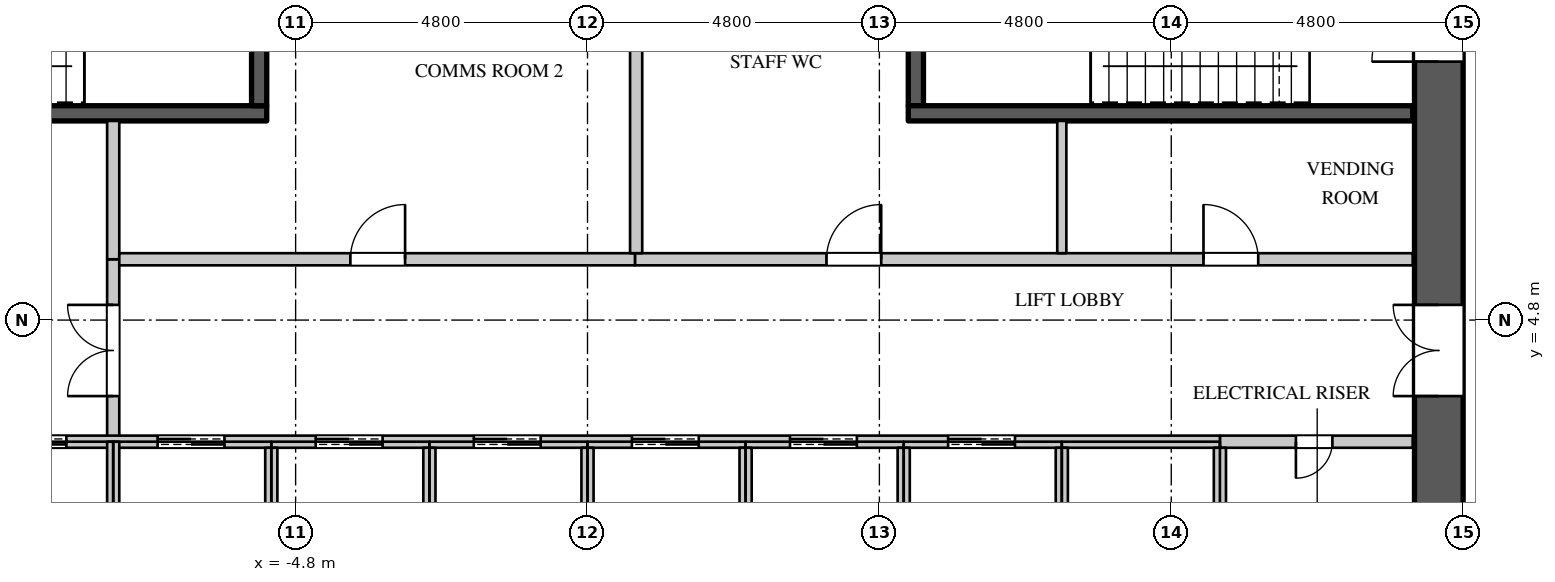
"""IFC4 building model, lengths in metres.
Left out: names, types, materials, properties, quantities, classifications, styles, units other than length and angle.
Written with IfcOpenShell. Run it as: python <this file> out.ifc"""

import sys

from ifc_helpers import new_model, si_unit, direction, frame, frame_2d, origin, place, context, subcontext, project, spatial, rectangle, extrude, element, fill, save


model = new_model("IFC4")
c1 = context("Model", 3, precision=1e-05, world=origin(), true_north=direction((0.0, 1.0)))
c2 = subcontext(c1, "Body", "Model", "MODEL_VIEW")
j1 = project(units=[si_unit("LENGTHUNIT", "METRE"), si_unit("PLANEANGLEUNIT", "RADIAN")], contexts=[c1])
p1 = place(None, origin())
s1 = spatial("IfcSite", under=j1, at=p1, CompositionType="ELEMENT")
p2 = place(p1, origin())
s2 = spatial("IfcBuilding", under=s1, at=p2, CompositionType="ELEMENT")
p3 = place(p2, frame((0.0, 0.0, 148.5)))
s3 = spatial("IfcBuildingStorey", under=s2, at=p3, CompositionType="ELEMENT", Elevation=148.5)
p4 = place(p3, frame((14.0, -11.2, 0.0), z_axis=(0.0, 0.0, 1.0), x_axis=(0.0, 1.0, 0.0)))
e1 = element("IfcWall", 1, at=p4, inside=s3, PredefinedType="SHEAR", context=c2, shape_type="SweptSolid", body=[
    extrude(rectangle(XDim=22.4, YDim=0.8, at=frame_2d((11.2, 0.0))), origin(), (0.0, 0.0, 1.0), 4.2),
])
p5 = place(p4, frame((20.25, 0.0, 0.0)))
e2 = element("IfcOpeningElement", 2, at=p5, cuts=e1, PredefinedType="OPENING", context=c2, shape_type="SweptSolid", body=[
    extrude(rectangle(XDim=1.1, YDim=2.2, at=frame_2d((0.55, 1.1))), frame((0.0, 0.41, 0.0), z_axis=(0.0, -1.0, 0.0), x_axis=(1.0, 0.0, 0.0)), (0.0, 0.0, 1.0), 0.82),
])
p6 = place(p4, frame((1.05, 0.0, 0.0)))
e3 = element("IfcOpeningElement", 3, at=p6, cuts=e1, PredefinedType="OPENING", context=c2, shape_type="SweptSolid", body=[
    extrude(rectangle(XDim=1.1, YDim=2.2, at=frame_2d((0.55, 1.1))), frame((0.0, 0.41, 0.0), z_axis=(0.0, -1.0, 0.0), x_axis=(1.0, 0.0, 0.0)), (0.0, 0.0, 1.0), 0.82),
])
p7 = place(p4, frame((14.75, 0.0, 0.0)))
e4 = element("IfcOpeningElement", 4, at=p7, cuts=e1, PredefinedType="OPENING", context=c2, shape_type="SweptSolid", body=[
    extrude(rectangle(XDim=1.5, YDim=2.4, at=frame_2d((0.75, 1.2))), frame((0.0, 0.41, 0.0), z_axis=(0.0, -1.0, 0.0), x_axis=(1.0, 0.0, 0.0)), (0.0, 0.0, 1.0), 0.82),
])
p8 = place(p4, frame((6.15, 0.0, 0.0)))
e5 = element("IfcOpeningElement", 5, at=p8, cuts=e1, PredefinedType="OPENING", context=c2, shape_type="SweptSolid", body=[
    extrude(rectangle(XDim=1.5, YDim=2.4, at=frame_2d((0.75, 1.2))), frame((0.0, 0.41, 0.0), z_axis=(0.0, -1.0, 0.0), x_axis=(1.0, 0.0, 0.0)), (0.0, 0.0, 1.0), 0.82),
])
p9 = place(p3, frame((-7.8, 2.8, 0.0), z_axis=(0.0, 0.0, 1.0), x_axis=(0.0, 1.0, 0.0)))
e6 = element("IfcWall", 6, at=p9, inside=s3, PredefinedType="PARTITIONING", context=c2, shape_type="SweptSolid", body=[
    extrude(rectangle(XDim=3.0, YDim=0.2, at=frame_2d((1.5, 0.0))), origin(), (0.0, 0.0, 1.0), 3.798),
])
p10 = place(p9, frame((0.75, 0.0, 0.0)))
e7 = element("IfcOpeningElement", 7, at=p10, cuts=e6, PredefinedType="OPENING", context=c2, shape_type="SweptSolid", body=[
    extrude(rectangle(XDim=1.5, YDim=2.4, at=frame_2d((0.75, 1.2))), frame((0.0, 0.11, 0.0), z_axis=(0.0, -1.0, 0.0), x_axis=(1.0, 0.0, 0.0)), (0.0, 0.0, 1.0), 0.22),
])
p11 = place(p3, frame((0.78, 5.8, 0.0), z_axis=(0.0, 0.0, 1.0), x_axis=(1.0, 0.0, 0.0)))
e8 = element("IfcWall", 8, at=p11, inside=s3, PredefinedType="PARTITIONING", context=c2, shape_type="SweptSolid", body=[
    extrude(rectangle(XDim=12.79, YDim=0.2, at=frame_2d((6.395, 0.0))), origin(), (0.0, 0.0, 1.0), 3.798),
])
p12 = place(p11, frame((3.15, 0.0, 0.0)))
e9 = element("IfcOpeningElement", 9, at=p12, cuts=e8, PredefinedType="OPENING", context=c2, shape_type="SweptSolid", body=[
    extrude(rectangle(XDim=0.9, YDim=2.2, at=frame_2d((0.45, 1.1))), frame((0.0, 0.11, 0.0), z_axis=(0.0, -1.0, 0.0), x_axis=(1.0, 0.0, 0.0)), (0.0, 0.0, 1.0), 0.22),
])
p13 = place(p11, frame((9.35, 0.0, 0.0)))
e10 = element("IfcOpeningElement", 10, at=p13, cuts=e8, PredefinedType="OPENING", context=c2, shape_type="SweptSolid", body=[
    extrude(rectangle(XDim=0.9, YDim=2.2, at=frame_2d((0.45, 1.1))), frame((0.0, 0.11, 0.0), z_axis=(0.0, -1.0, 0.0), x_axis=(1.0, 0.0, 0.0)), (0.0, 0.0, 1.0), 0.22),
])
p14 = place(p3, frame((7.8, 5.9, 0.0), z_axis=(0.0, 0.0, 1.0), x_axis=(0.0, 1.0, 0.0)))
e11 = element("IfcWall", 11, at=p14, inside=s3, PredefinedType="PARTITIONING", context=c2, shape_type="SweptSolid", body=[
    extrude(rectangle(XDim=2.175, YDim=0.15, at=frame_2d((1.087, 0.0))), origin(), (0.0, 0.0, 1.0), 3.798),
])
p15 = place(p3, frame((-7.8, 5.8, 0.0), z_axis=(0.0, 0.0, 1.0), x_axis=(0.0, 1.0, 0.0)))
e12 = element("IfcWall", 12, at=p15, inside=s3, PredefinedType="PARTITIONING", context=c2, shape_type="SweptSolid", body=[
    extrude(rectangle(XDim=2.275, YDim=0.2, at=frame_2d((1.137, 0.0))), origin(), (0.0, 0.0, 1.0), 3.798),
])
p16 = place(p3, frame((-7.7, 5.8, 0.0), z_axis=(0.0, 0.0, 1.0), x_axis=(1.0, 0.0, 0.0)))
e13 = element("IfcWall", 13, at=p16, inside=s3, PredefinedType="PARTITIONING", context=c2, shape_type="SweptSolid", body=[
    extrude(rectangle(XDim=8.48, YDim=0.2, at=frame_2d((4.24, 0.0))), origin(), (0.0, 0.0, 1.0), 3.798),
])
p17 = place(p16, frame((3.8, 0.0, 0.0)))
e14 = element("IfcOpeningElement", 14, at=p17, cuts=e13, PredefinedType="OPENING", context=c2, shape_type="SweptSolid", body=[
    extrude(rectangle(XDim=0.9, YDim=2.2, at=frame_2d((0.45, 1.1))), frame((0.0, 0.11, 0.0), z_axis=(0.0, -1.0, 0.0), x_axis=(1.0, 0.0, 0.0)), (0.0, 0.0, 1.0), 0.22),
])
p18 = place(p3, frame((0.8, 5.9, 0.0), z_axis=(0.0, 0.0, 1.0), x_axis=(0.0, 1.0, 0.0)))
e15 = element("IfcWall", 15, at=p18, inside=s3, PredefinedType="PARTITIONING", context=c2, shape_type="SweptSolid", body=[
    extrude(rectangle(XDim=5.27, YDim=0.2, at=frame_2d((2.635, 0.0))), origin(), (0.0, 0.0, 1.0), 3.798),
])
p19 = place(p3, frame((10.4, 2.8, 0.0), z_axis=(0.0, 0.0, 1.0), x_axis=(1.0, 0.0, 0.0)))
e16 = element("IfcWall", 16, at=p19, inside=s3, PredefinedType="PARTITIONING", context=c2, shape_type="SweptSolid", body=[
    extrude(rectangle(XDim=3.17, YDim=0.2, at=frame_2d((1.585, 0.0))), origin(), (0.0, 0.0, 1.0), 3.798),
])
p20 = place(p19, frame((1.25, 0.0, 0.0)))
e17 = element("IfcOpeningElement", 17, at=p20, cuts=e16, PredefinedType="OPENING", context=c2, shape_type="SweptSolid", body=[
    extrude(rectangle(XDim=0.6, YDim=2.0, at=frame_2d((0.3, 1.0))), frame((0.0, 0.11, 0.0), z_axis=(0.0, -1.0, 0.0), x_axis=(1.0, 0.0, 0.0)), (0.0, 0.0, 1.0), 0.22),
])
p21 = place(p3, frame((-13.57, 2.8, 0.0), z_axis=(0.0, 0.0, 1.0), x_axis=(1.0, 0.0, 0.0)))
e18 = element("IfcWall", 18, at=p21, inside=s3, PredefinedType="PARTITIONING", context=c2, shape_type="SweptSolid", body=[
    extrude(rectangle(XDim=23.97, YDim=0.2, at=frame_2d((11.985, 0.0))), origin(), (0.0, 0.0, 1.0), 3.798),
])
p22 = place(p21, frame((1.0, 0.0, 0.0)))
e19 = element("IfcOpeningElement", 19, at=p22, cuts=e18, PredefinedType="OPENING", context=c2, shape_type="SweptSolid", body=[
    extrude(rectangle(XDim=1.1, YDim=2.2, at=frame_2d((0.55, 1.1))), frame((0.0, 0.11, 0.0), z_axis=(0.0, -1.0, 0.0), x_axis=(1.0, 0.0, 0.0)), (0.0, 0.0, 1.0), 0.22),
])
p23 = place(p21, frame((3.9, 0.0, 0.0)))
e20 = element("IfcOpeningElement", 20, at=p23, cuts=e18, PredefinedType="OPENING", context=c2, shape_type="SweptSolid", body=[
    extrude(rectangle(XDim=1.1, YDim=2.2, at=frame_2d((0.55, 1.1))), frame((0.0, 0.11, 0.0), z_axis=(0.0, -1.0, 0.0), x_axis=(1.0, 0.0, 0.0)), (0.0, 0.0, 1.0), 0.22),
])
p24 = place(p21, frame((6.5, 0.0, 0.0)))
e21 = element("IfcOpeningElement", 21, at=p24, cuts=e18, PredefinedType="OPENING", context=c2, shape_type="SweptSolid", body=[
    extrude(rectangle(XDim=1.1, YDim=2.2, at=frame_2d((0.55, 1.1))), frame((0.0, 0.11, 0.0), z_axis=(0.0, -1.0, 0.0), x_axis=(1.0, 0.0, 0.0)), (0.0, 0.0, 1.0), 0.22),
])
p25 = place(p21, frame((9.1, 0.0, 0.0)))
e22 = element("IfcOpeningElement", 22, at=p25, cuts=e18, PredefinedType="OPENING", context=c2, shape_type="SweptSolid", body=[
    extrude(rectangle(XDim=1.1, YDim=2.2, at=frame_2d((0.55, 1.1))), frame((0.0, 0.11, 0.0), z_axis=(0.0, -1.0, 0.0), x_axis=(1.0, 0.0, 0.0)), (0.0, 0.0, 1.0), 0.22),
])
p26 = place(p21, frame((11.7, 0.0, 0.0)))
e23 = element("IfcOpeningElement", 23, at=p26, cuts=e18, PredefinedType="OPENING", context=c2, shape_type="SweptSolid", body=[
    extrude(rectangle(XDim=1.1, YDim=2.2, at=frame_2d((0.55, 1.1))), frame((0.0, 0.11, 0.0), z_axis=(0.0, -1.0, 0.0), x_axis=(1.0, 0.0, 0.0)), (0.0, 0.0, 1.0), 0.22),
])
p27 = place(p21, frame((14.3, 0.0, 0.0)))
e24 = element("IfcOpeningElement", 24, at=p27, cuts=e18, PredefinedType="OPENING", context=c2, shape_type="SweptSolid", body=[
    extrude(rectangle(XDim=1.1, YDim=2.2, at=frame_2d((0.55, 1.1))), frame((0.0, 0.11, 0.0), z_axis=(0.0, -1.0, 0.0), x_axis=(1.0, 0.0, 0.0)), (0.0, 0.0, 1.0), 0.22),
])
p28 = place(p21, frame((16.9, 0.0, 0.0)))
e25 = element("IfcOpeningElement", 25, at=p28, cuts=e18, PredefinedType="OPENING", context=c2, shape_type="SweptSolid", body=[
    extrude(rectangle(XDim=1.1, YDim=2.2, at=frame_2d((0.55, 1.1))), frame((0.0, 0.11, 0.0), z_axis=(0.0, -1.0, 0.0), x_axis=(1.0, 0.0, 0.0)), (0.0, 0.0, 1.0), 0.22),
])
p29 = place(p21, frame((19.5, 0.0, 0.0)))
e26 = element("IfcOpeningElement", 26, at=p29, cuts=e18, PredefinedType="OPENING", context=c2, shape_type="SweptSolid", body=[
    extrude(rectangle(XDim=1.1, YDim=2.2, at=frame_2d((0.55, 1.1))), frame((0.0, 0.11, 0.0), z_axis=(0.0, -1.0, 0.0), x_axis=(1.0, 0.0, 0.0)), (0.0, 0.0, 1.0), 0.22),
])
p30 = place(p3, frame((-7.8, 0.0, 0.0), z_axis=(0.0, 0.0, 1.0), x_axis=(0.0, 1.0, 0.0)))
e27 = element("IfcWall", 27, at=p30, inside=s3, PredefinedType="PARTITIONING", context=c2, shape_type="SweptSolid", body=[
    extrude(rectangle(XDim=2.8, YDim=0.2, at=frame_2d((1.4, 0.0))), origin(), (0.0, 0.0, 1.0), 3.798),
])
p31 = place(p3, frame((-5.2, 0.1, 0.0), z_axis=(0.0, 0.0, 1.0), x_axis=(0.0, 1.0, 0.0)))
e28 = element("IfcWall", 28, at=p31, inside=s3, PredefinedType="PARTITIONING", context=c2, shape_type="SweptSolid", body=[
    extrude(rectangle(XDim=2.6, YDim=0.2, at=frame_2d((1.3, 0.0))), origin(), (0.0, 0.0, 1.0), 3.798),
])
p32 = place(p3, frame((-2.6, 0.0, 0.0), z_axis=(0.0, 0.0, 1.0), x_axis=(0.0, 1.0, 0.0)))
e29 = element("IfcWall", 29, at=p32, inside=s3, PredefinedType="PARTITIONING", context=c2, shape_type="SweptSolid", body=[
    extrude(rectangle(XDim=2.7, YDim=0.2, at=frame_2d((1.35, 0.0))), origin(), (0.0, 0.0, 1.0), 3.798),
])
for number, where, z_axis, x_axis in (
    (30, (0.0, 0.1, 0.0), (0.0, 0.0, 1.0), (0.0, 1.0, 0.0)),
    (31, (2.6, 0.1, 0.0), (0.0, 0.0, 1.0), (0.0, 1.0, 0.0)),
    (32, (5.2, 0.1, 0.0), (0.0, 0.0, 1.0), (0.0, 1.0, 0.0)),
):
    element("IfcWall", number, at=place(p3, frame(where, z_axis=z_axis, x_axis=x_axis)), inside=s3, PredefinedType="PARTITIONING", context=c2, shape_type="SweptSolid", body=[
        extrude(rectangle(XDim=2.6, YDim=0.2, at=frame_2d((1.3, 0.0))), origin(), (0.0, 0.0, 1.0), 3.798),
    ])
p33 = place(p3, frame((7.8, 0.0, 0.0), z_axis=(0.0, 0.0, 1.0), x_axis=(0.0, 1.0, 0.0)))
e33 = element("IfcWall", 33, at=p33, inside=s3, PredefinedType="PARTITIONING", context=c2, shape_type="SweptSolid", body=[
    extrude(rectangle(XDim=2.7, YDim=0.2, at=frame_2d((1.35, 0.0))), origin(), (0.0, 0.0, 1.0), 3.798),
])
p34 = place(p3, frame((10.4, -2.7, 0.0), z_axis=(0.0, 0.0, 1.0), x_axis=(0.0, 1.0, 0.0)))
e34 = element("IfcWall", 34, at=p34, inside=s3, PredefinedType="PARTITIONING", context=c2, shape_type="SweptSolid", body=[
    extrude(rectangle(XDim=5.4, YDim=0.2, at=frame_2d((2.7, 0.0))), origin(), (0.0, 0.0, 1.0), 3.798),
])
p35 = place(p3, frame((-13.57, 8.2, 0.0), z_axis=(0.0, 0.0, 1.0), x_axis=(1.0, 0.0, 0.0)))
e35 = element("IfcWall", 35, at=p35, inside=s3, PredefinedType="SHEAR", context=c2, shape_type="SweptSolid", body=[
    extrude(rectangle(XDim=8.295, YDim=0.25, at=frame_2d((4.147, 0.0))), origin(), (0.0, 0.0, 1.0), 3.798),
])
p36 = place(p35, frame((0.15, 0.0, 0.0)))
e36 = element("IfcOpeningElement", 36, at=p36, cuts=e35, PredefinedType="OPENING", context=c2, shape_type="SweptSolid", body=[
    extrude(rectangle(XDim=1.1, YDim=2.2, at=frame_2d((0.55, 1.1))), frame((0.0, 0.135, 0.0), z_axis=(0.0, -1.0, 0.0), x_axis=(1.0, 0.0, 0.0)), (0.0, 0.0, 1.0), 0.27),
])
for number, where, z_axis, x_axis in (
    (37, (-5.4, 8.325, 0.0), (0.0, 0.0, 1.0), (0.0, 1.0, 0.0)),
    (38, (5.4, 8.325, 0.0), (0.0, 0.0, 1.0), (0.0, 1.0, 0.0)),
):
    element("IfcWall", number, at=place(p3, frame(where, z_axis=z_axis, x_axis=x_axis)), inside=s3, PredefinedType="SHEAR", context=c2, shape_type="SweptSolid", body=[
        extrude(rectangle(XDim=2.845, YDim=0.25, at=frame_2d((1.422, 0.0))), origin(), (0.0, 0.0, 1.0), 3.798),
    ])
p37 = place(p3, frame((5.275, 8.2, 0.0), z_axis=(0.0, 0.0, 1.0), x_axis=(1.0, 0.0, 0.0)))
e39 = element("IfcWall", 39, at=p37, inside=s3, PredefinedType="SHEAR", context=c2, shape_type="SweptSolid", body=[
    extrude(rectangle(XDim=8.295, YDim=0.25, at=frame_2d((4.147, 0.0))), origin(), (0.0, 0.0, 1.0), 3.798),
])
p38 = place(p20, origin())
e40 = element("IfcDoor", 40, at=p38, inside=s3, OperationType="SINGLE_SWING_RIGHT", PredefinedType="DOOR", context=c2, shape_type="SweptSolid", body=[
    extrude(rectangle(XDim=0.6, YDim=2.0, at=frame_2d((0.3, 1.0))), frame((0.0, 0.025, 0.0), z_axis=(0.0, -1.0, 0.0), x_axis=(1.0, 0.0, 0.0)), (0.0, 0.0, 1.0), 0.05),
])
fill(e17, e40)
p39 = place(p17, origin())
e41 = element("IfcDoor", 41, at=p39, inside=s3, OperationType="SINGLE_SWING_RIGHT", PredefinedType="DOOR", context=c2, shape_type="SweptSolid", body=[
    extrude(rectangle(XDim=0.9, YDim=2.2, at=frame_2d((0.45, 1.1))), frame((0.0, 0.025, 0.0), z_axis=(0.0, -1.0, 0.0), x_axis=(1.0, 0.0, 0.0)), (0.0, 0.0, 1.0), 0.05),
])
fill(e14, e41)
p40 = place(p12, origin())
e42 = element("IfcDoor", 42, at=p40, inside=s3, OperationType="SINGLE_SWING_RIGHT", PredefinedType="DOOR", context=c2, shape_type="SweptSolid", body=[
    extrude(rectangle(XDim=0.9, YDim=2.2, at=frame_2d((0.45, 1.1))), frame((0.0, 0.025, 0.0), z_axis=(0.0, -1.0, 0.0), x_axis=(1.0, 0.0, 0.0)), (0.0, 0.0, 1.0), 0.05),
])
fill(e9, e42)
p41 = place(p13, origin())
e43 = element("IfcDoor", 43, at=p41, inside=s3, OperationType="SINGLE_SWING_LEFT", PredefinedType="DOOR", context=c2, shape_type="SweptSolid", body=[
    extrude(rectangle(XDim=0.9, YDim=2.2, at=frame_2d((0.45, 1.1))), frame((0.0, 0.025, 0.0), z_axis=(0.0, -1.0, 0.0), x_axis=(1.0, 0.0, 0.0)), (0.0, 0.0, 1.0), 0.05),
])
fill(e10, e43)
p42 = place(p23, origin())
e44 = element("IfcDoor", 44, at=p42, inside=s3, OperationType="DOUBLE_DOOR_SLIDING", PredefinedType="DOOR", context=c2, shape_type="SweptSolid", body=[
    extrude(rectangle(XDim=1.1, YDim=2.2, at=frame_2d((0.55, 1.1))), frame((0.0, 0.025, 0.0), z_axis=(0.0, -1.0, 0.0), x_axis=(1.0, 0.0, 0.0)), (0.0, 0.0, 1.0), 0.05),
])
fill(e20, e44)
p43 = place(p24, origin())
e45 = element("IfcDoor", 45, at=p43, inside=s3, OperationType="DOUBLE_DOOR_SLIDING", PredefinedType="DOOR", context=c2, shape_type="SweptSolid", body=[
    extrude(rectangle(XDim=1.1, YDim=2.2, at=frame_2d((0.55, 1.1))), frame((0.0, 0.025, 0.0), z_axis=(0.0, -1.0, 0.0), x_axis=(1.0, 0.0, 0.0)), (0.0, 0.0, 1.0), 0.05),
])
fill(e21, e45)
p44 = place(p25, origin())
e46 = element("IfcDoor", 46, at=p44, inside=s3, OperationType="DOUBLE_DOOR_SLIDING", PredefinedType="DOOR", context=c2, shape_type="SweptSolid", body=[
    extrude(rectangle(XDim=1.1, YDim=2.2, at=frame_2d((0.55, 1.1))), frame((0.0, 0.025, 0.0), z_axis=(0.0, -1.0, 0.0), x_axis=(1.0, 0.0, 0.0)), (0.0, 0.0, 1.0), 0.05),
])
fill(e22, e46)
p45 = place(p26, origin())
e47 = element("IfcDoor", 47, at=p45, inside=s3, OperationType="DOUBLE_DOOR_SLIDING", PredefinedType="DOOR", context=c2, shape_type="SweptSolid", body=[
    extrude(rectangle(XDim=1.1, YDim=2.2, at=frame_2d((0.55, 1.1))), frame((0.0, 0.025, 0.0), z_axis=(0.0, -1.0, 0.0), x_axis=(1.0, 0.0, 0.0)), (0.0, 0.0, 1.0), 0.05),
])
fill(e23, e47)
p46 = place(p27, origin())
e48 = element("IfcDoor", 48, at=p46, inside=s3, OperationType="DOUBLE_DOOR_SLIDING", PredefinedType="DOOR", context=c2, shape_type="SweptSolid", body=[
    extrude(rectangle(XDim=1.1, YDim=2.2, at=frame_2d((0.55, 1.1))), frame((0.0, 0.025, 0.0), z_axis=(0.0, -1.0, 0.0), x_axis=(1.0, 0.0, 0.0)), (0.0, 0.0, 1.0), 0.05),
])
fill(e24, e48)
p47 = place(p28, origin())
e49 = element("IfcDoor", 49, at=p47, inside=s3, OperationType="DOUBLE_DOOR_SLIDING", PredefinedType="DOOR", context=c2, shape_type="SweptSolid", body=[
    extrude(rectangle(XDim=1.1, YDim=2.2, at=frame_2d((0.55, 1.1))), frame((0.0, 0.025, 0.0), z_axis=(0.0, -1.0, 0.0), x_axis=(1.0, 0.0, 0.0)), (0.0, 0.0, 1.0), 0.05),
])
fill(e25, e49)
p48 = place(p29, origin())
e50 = element("IfcDoor", 50, at=p48, inside=s3, OperationType="DOUBLE_DOOR_SLIDING", PredefinedType="DOOR", context=c2, shape_type="SweptSolid", body=[
    extrude(rectangle(XDim=1.1, YDim=2.2, at=frame_2d((0.55, 1.1))), frame((0.0, 0.025, 0.0), z_axis=(0.0, -1.0, 0.0), x_axis=(1.0, 0.0, 0.0)), (0.0, 0.0, 1.0), 0.05),
])
fill(e26, e50)
p49 = place(p10, origin())
e51 = element("IfcDoor", 51, at=p49, inside=s3, OperationType="DOUBLE_DOOR_SINGLE_SWING", PredefinedType="DOOR", context=c2, shape_type="SweptSolid", body=[
    extrude(rectangle(XDim=1.5, YDim=2.4, at=frame_2d((0.75, 1.2))), frame((0.0, 0.025, 0.0), z_axis=(0.0, -1.0, 0.0), x_axis=(1.0, 0.0, 0.0)), (0.0, 0.0, 1.0), 0.05),
])
fill(e7, e51)
p50 = place(p5, origin())
e52 = element("IfcDoor", 52, at=p50, inside=s3, OperationType="SINGLE_SWING_LEFT", PredefinedType="DOOR", context=c2, shape_type="SweptSolid", body=[
    extrude(rectangle(XDim=1.1, YDim=2.2, at=frame_2d((0.55, 1.1))), frame((0.0, 0.395, 0.0), z_axis=(0.0, -1.0, 0.0), x_axis=(1.0, 0.0, 0.0)), (0.0, 0.0, 1.0), 0.05),
])
fill(e2, e52)
p51 = place(p7, origin())
e53 = element("IfcDoor", 53, at=p51, inside=s3, OperationType="DOUBLE_DOOR_SINGLE_SWING", PredefinedType="DOOR", context=c2, shape_type="SweptSolid", body=[
    extrude(rectangle(XDim=1.5, YDim=2.4, at=frame_2d((0.75, 1.2))), frame((0.0, 0.395, 0.0), z_axis=(0.0, -1.0, 0.0), x_axis=(1.0, 0.0, 0.0)), (0.0, 0.0, 1.0), 0.05),
])
fill(e4, e53)
save(model, sys.argv[1])
